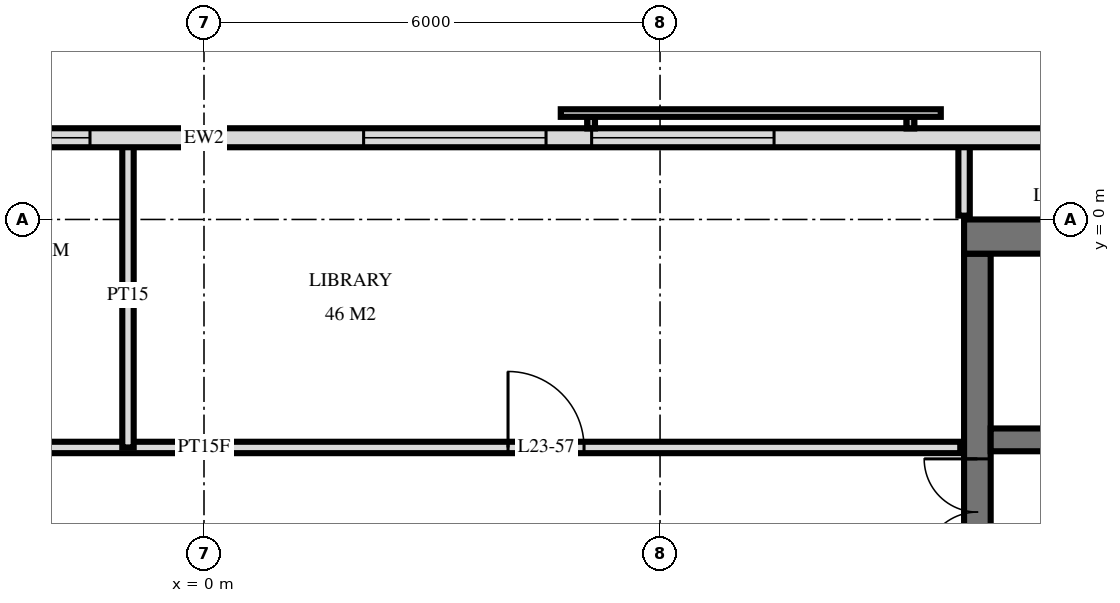
"""IFC4 building model, lengths in metres.
Left out: names, types, materials, properties, quantities, classifications, styles, units other than length and angle.
Written with IfcOpenShell. Run it as: python <this file> out.ifc"""

import sys

from ifc_helpers import new_model, si_unit, direction, frame, frame_2d, origin, place, context, subcontext, project, spatial, rectangle, extrude, element, fill, save


model = new_model("IFC4")
c1 = context("Model", 3, precision=1e-05, world=origin(), true_north=direction((0.0, 1.0)))
c2 = subcontext(c1, "Body", "Model", "MODEL_VIEW")
j1 = project(units=[si_unit("LENGTHUNIT", "METRE"), si_unit("PLANEANGLEUNIT", "RADIAN")], contexts=[c1])
p1 = place(None, origin())
s1 = spatial("IfcSite", under=j1, at=p1, CompositionType="ELEMENT")
p2 = place(p1, origin())
s2 = spatial("IfcBuilding", under=s1, at=p2, CompositionType="ELEMENT")
p3 = place(p2, frame((0.0, 0.0, 92.4)))
s3 = spatial("IfcBuildingStorey", under=s2, at=p3, CompositionType="ELEMENT", Elevation=92.4)
p4 = place(p3, frame((10.0, -0.225, 0.0), z_axis=(0.0, 0.0, 1.0), x_axis=(1.0, 0.0, 0.0)))
e1 = element("IfcWall", 1, at=p4, inside=s3, PredefinedType="SHEAR", context=c2, shape_type="SweptSolid", body=[
    extrude(rectangle(XDim=19.5, YDim=0.45, at=frame_2d((9.75, 0.0))), origin(), (0.0, 0.0, 1.0), 3.6),
])
p5 = place(p3, frame((10.175, -14.55, 0.0), z_axis=(0.0, 0.0, 1.0), x_axis=(0.0, 1.0, 0.0)))
e2 = element("IfcWall", 2, at=p5, inside=s3, PredefinedType="SHEAR", context=c2, shape_type="SweptSolid", body=[
    extrude(rectangle(XDim=14.1, YDim=0.35, at=frame_2d((7.05, 0.0))), origin(), (0.0, 0.0, 1.0), 3.6),
])
p6 = place(p5, frame((8.4, 0.0, 0.0)))
e3 = element("IfcOpeningElement", 3, at=p6, cuts=e2, PredefinedType="OPENING", context=c2, shape_type="SweptSolid", body=[
    extrude(rectangle(XDim=1.4, YDim=2.4, at=frame_2d((0.7, 1.2))), frame((0.0, 0.185, 0.0), z_axis=(0.0, -1.0, 0.0), x_axis=(1.0, 0.0, 0.0)), (0.0, 0.0, 1.0), 0.37),
])
p7 = place(p5, frame((10.0, 0.0, 0.0)))
e4 = element("IfcOpeningElement", 4, at=p7, cuts=e2, PredefinedType="OPENING", context=c2, shape_type="SweptSolid", body=[
    extrude(rectangle(XDim=1.4, YDim=2.4, at=frame_2d((0.7, 1.2))), frame((0.0, 0.185, 0.0), z_axis=(0.0, -1.0, 0.0), x_axis=(1.0, 0.0, 0.0)), (0.0, 0.0, 1.0), 0.37),
])
p8 = place(p5, frame((4.0, 0.0, 0.0)))
e5 = element("IfcOpeningElement", 5, at=p8, cuts=e2, PredefinedType="OPENING", context=c2, shape_type="SweptSolid", body=[
    extrude(rectangle(XDim=1.2, YDim=2.1, at=frame_2d((0.6, 1.05))), frame((0.0, 0.185, 0.0), z_axis=(0.0, -1.0, 0.0), x_axis=(1.0, 0.0, 0.0)), (0.0, 0.0, 1.0), 0.37),
])
p9 = place(p3, frame((10.35, -2.9, 0.0), z_axis=(0.0, 0.0, 1.0), x_axis=(1.0, 0.0, 0.0)))
e6 = element("IfcWall", 6, at=p9, inside=s3, PredefinedType="SHEAR", context=c2, shape_type="SweptSolid", body=[
    extrude(rectangle(XDim=18.7, YDim=0.3, at=frame_2d((9.35, 0.0))), origin(), (0.0, 0.0, 1.0), 3.6),
])
p10 = place(p9, frame((14.65, 0.0, 0.0)))
e7 = element("IfcOpeningElement", 7, at=p10, cuts=e6, PredefinedType="OPENING", context=c2, shape_type="SweptSolid", body=[
    extrude(rectangle(XDim=1.1, YDim=2.1, at=frame_2d((0.55, 1.05))), frame((0.0, 0.16, 0.0), z_axis=(0.0, -1.0, 0.0), x_axis=(1.0, 0.0, 0.0)), (0.0, 0.0, 1.0), 0.32),
])
p11 = place(p9, frame((17.05, 0.0, 0.0)))
e8 = element("IfcOpeningElement", 8, at=p11, cuts=e6, PredefinedType="OPENING", context=c2, shape_type="SweptSolid", body=[
    extrude(rectangle(XDim=1.1, YDim=2.1, at=frame_2d((0.55, 1.05))), frame((0.0, 0.16, 0.0), z_axis=(0.0, -1.0, 0.0), x_axis=(1.0, 0.0, 0.0)), (0.0, 0.0, 1.0), 0.32),
])
p12 = place(p9, frame((6.9, 0.0, 0.0)))
e9 = element("IfcOpeningElement", 9, at=p12, cuts=e6, PredefinedType="OPENING", context=c2, shape_type="SweptSolid", body=[
    extrude(rectangle(XDim=0.9, YDim=2.1, at=frame_2d((0.45, 1.05))), frame((0.0, 0.16, 0.0), z_axis=(0.0, -1.0, 0.0), x_axis=(1.0, 0.0, 0.0)), (0.0, 0.0, 1.0), 0.32),
])
p13 = place(p9, frame((0.85, 0.0, 0.0)))
e10 = element("IfcOpeningElement", 10, at=p13, cuts=e6, PredefinedType="OPENING", context=c2, shape_type="SweptSolid", body=[
    extrude(rectangle(XDim=1.0, YDim=2.1, at=frame_2d((0.5, 1.05))), frame((0.0, 0.16, 0.0), z_axis=(0.0, -1.0, 0.0), x_axis=(1.0, 0.0, 0.0)), (0.0, 0.0, 1.0), 0.32),
])
p14 = place(p9, frame((3.387, 0.0, 0.0)))
e11 = element("IfcOpeningElement", 11, at=p14, cuts=e6, PredefinedType="OPENING", context=c2, shape_type="SweptSolid", body=[
    extrude(rectangle(XDim=1.0, YDim=2.1, at=frame_2d((0.5, 1.05))), frame((0.0, 0.16, 0.0), z_axis=(0.0, -1.0, 0.0), x_axis=(1.0, 0.0, 0.0)), (0.0, 0.0, 1.0), 0.32),
])
p15 = place(p9, frame((4.812, 0.0, 0.0)))
e12 = element("IfcOpeningElement", 12, at=p15, cuts=e6, PredefinedType="OPENING", context=c2, shape_type="SweptSolid", body=[
    extrude(rectangle(XDim=1.0, YDim=2.1, at=frame_2d((0.5, 1.05))), frame((0.0, 0.16, 0.0), z_axis=(0.0, -1.0, 0.0), x_axis=(1.0, 0.0, 0.0)), (0.0, 0.0, 1.0), 0.32),
])
p16 = place(p9, frame((12.1, 0.0, 0.0)))
e13 = element("IfcOpeningElement", 13, at=p16, cuts=e6, PredefinedType="OPENING", context=c2, shape_type="SweptSolid", body=[
    extrude(rectangle(XDim=1.0, YDim=2.1, at=frame_2d((0.5, 1.05))), frame((0.0, 0.16, 0.0), z_axis=(0.0, -1.0, 0.0), x_axis=(1.0, 0.0, 0.0)), (0.0, 0.0, 1.0), 0.32),
])
p17 = place(p3, frame((28.775, 1.075, 0.0), z_axis=(0.0, 0.0, 1.0), x_axis=(-1.0, 0.0, 0.0)))
e14 = element("IfcWall", 14, at=p17, inside=s3, PredefinedType="SOLIDWALL", context=c2, shape_type="SweptSolid", body=[
    extrude(rectangle(XDim=57.551, YDim=0.25, at=frame_2d((28.775, 0.0))), origin(), (0.0, 0.0, 1.0), 3.32),
])
p18 = place(p17, frame((21.275, 0.0, 0.3)))
e15 = element("IfcOpeningElement", 15, at=p18, cuts=e14, PredefinedType="OPENING", context=c2, shape_type="SweptSolid", body=[
    extrude(rectangle(XDim=2.4, YDim=2.1, at=frame_2d((1.2, 1.05))), frame((0.0, 0.135, 0.0), z_axis=(0.0, -1.0, 0.0), x_axis=(1.0, 0.0, 0.0)), (0.0, 0.0, 1.0), 0.27),
])
p19 = place(p17, frame((24.275, 0.0, 0.3)))
e16 = element("IfcOpeningElement", 16, at=p19, cuts=e14, PredefinedType="OPENING", context=c2, shape_type="SweptSolid", body=[
    extrude(rectangle(XDim=2.4, YDim=2.1, at=frame_2d((1.2, 1.05))), frame((0.0, 0.135, 0.0), z_axis=(0.0, -1.0, 0.0), x_axis=(1.0, 0.0, 0.0)), (0.0, 0.0, 1.0), 0.27),
])
p20 = place(p17, frame((30.275, 0.0, 0.3)))
e17 = element("IfcOpeningElement", 17, at=p20, cuts=e14, PredefinedType="OPENING", context=c2, shape_type="SweptSolid", body=[
    extrude(rectangle(XDim=2.4, YDim=2.1, at=frame_2d((1.2, 1.05))), frame((0.0, 0.135, 0.0), z_axis=(0.0, -1.0, 0.0), x_axis=(1.0, 0.0, 0.0)), (0.0, 0.0, 1.0), 0.27),
])
p21 = place(p3, frame((10.0, 0.05, 0.0), z_axis=(0.0, 0.0, 1.0), x_axis=(0.0, 1.0, 0.0)))
e18 = element("IfcWall", 18, at=p21, inside=s3, PredefinedType="PARTITIONING", context=c2, shape_type="SweptSolid", body=[
    extrude(rectangle(XDim=0.97, YDim=0.15, at=frame_2d((0.485, 0.0))), origin(), (0.0, 0.0, 1.0), 3.32),
])
p22 = place(p3, frame((-1.0, -3.0, 0.0), z_axis=(0.0, 0.0, 1.0), x_axis=(0.0, 1.0, 0.0)))
e19 = element("IfcWall", 19, at=p22, inside=s3, PredefinedType="PARTITIONING", context=c2, shape_type="SweptSolid", body=[
    extrude(rectangle(XDim=4.02, YDim=0.15, at=frame_2d((2.01, 0.0))), origin(), (0.0, 0.0, 1.0), 3.32),
])
p23 = place(p3, frame((-9.95, -3.0, 0.0), z_axis=(0.0, 0.0, 1.0), x_axis=(1.0, 0.0, 0.0)))
e20 = element("IfcWall", 20, at=p23, inside=s3, PredefinedType="PARTITIONING", context=c2, shape_type="SweptSolid", body=[
    extrude(rectangle(XDim=19.9, YDim=0.15, at=frame_2d((9.95, 0.0))), origin(), (0.0, 0.0, 1.0), 3.32),
])
p24 = place(p23, frame((0.95, 0.0, 0.0)))
e21 = element("IfcOpeningElement", 21, at=p24, cuts=e20, PredefinedType="OPENING", context=c2, shape_type="SweptSolid", body=[
    extrude(rectangle(XDim=1.0, YDim=2.1, at=frame_2d((0.5, 1.05))), frame((0.0, 0.085, 0.0), z_axis=(0.0, -1.0, 0.0), x_axis=(1.0, 0.0, 0.0)), (0.0, 0.0, 1.0), 0.17),
])
p25 = place(p23, frame((3.7, 0.0, 0.0)))
e22 = element("IfcOpeningElement", 22, at=p25, cuts=e20, PredefinedType="OPENING", context=c2, shape_type="SweptSolid", body=[
    extrude(rectangle(XDim=1.0, YDim=2.1, at=frame_2d((0.5, 1.05))), frame((0.0, 0.085, 0.0), z_axis=(0.0, -1.0, 0.0), x_axis=(1.0, 0.0, 0.0)), (0.0, 0.0, 1.0), 0.17),
])
p26 = place(p23, frame((6.7, 0.0, 0.0)))
e23 = element("IfcOpeningElement", 23, at=p26, cuts=e20, PredefinedType="OPENING", context=c2, shape_type="SweptSolid", body=[
    extrude(rectangle(XDim=1.0, YDim=2.1, at=frame_2d((0.5, 1.05))), frame((0.0, 0.085, 0.0), z_axis=(0.0, -1.0, 0.0), x_axis=(1.0, 0.0, 0.0)), (0.0, 0.0, 1.0), 0.17),
])
p27 = place(p23, frame((13.95, 0.0, 0.0)))
e24 = element("IfcOpeningElement", 24, at=p27, cuts=e20, PredefinedType="OPENING", context=c2, shape_type="SweptSolid", body=[
    extrude(rectangle(XDim=1.0, YDim=2.1, at=frame_2d((0.5, 1.05))), frame((0.0, 0.085, 0.0), z_axis=(0.0, -1.0, 0.0), x_axis=(1.0, 0.0, 0.0)), (0.0, 0.0, 1.0), 0.17),
])
p28 = place(p18, origin())
e25 = element("IfcWindow", 25, at=p28, inside=s3, PartitioningType="SINGLE_PANEL", PredefinedType="WINDOW", context=c2, shape_type="SweptSolid", body=[
    extrude(rectangle(XDim=2.4, YDim=2.1, at=frame_2d((1.2, 1.05))), frame((0.0, 0.03, 0.0), z_axis=(0.0, -1.0, 0.0), x_axis=(1.0, 0.0, 0.0)), (0.0, 0.0, 1.0), 0.06),
])
fill(e15, e25)
p29 = place(p19, origin())
e26 = element("IfcWindow", 26, at=p29, inside=s3, PartitioningType="SINGLE_PANEL", PredefinedType="WINDOW", context=c2, shape_type="SweptSolid", body=[
    extrude(rectangle(XDim=2.4, YDim=2.1, at=frame_2d((1.2, 1.05))), frame((0.0, 0.03, 0.0), z_axis=(0.0, -1.0, 0.0), x_axis=(1.0, 0.0, 0.0)), (0.0, 0.0, 1.0), 0.06),
])
fill(e16, e26)
p30 = place(p20, origin())
e27 = element("IfcWindow", 27, at=p30, inside=s3, PartitioningType="SINGLE_PANEL", PredefinedType="WINDOW", context=c2, shape_type="SweptSolid", body=[
    extrude(rectangle(XDim=2.4, YDim=2.1, at=frame_2d((1.2, 1.05))), frame((0.0, 0.03, 0.0), z_axis=(0.0, -1.0, 0.0), x_axis=(1.0, 0.0, 0.0)), (0.0, 0.0, 1.0), 0.06),
])
fill(e17, e27)
p31 = place(p7, origin())
e28 = element("IfcDoor", 28, at=p31, inside=s3, OperationType="DOUBLE_DOOR_SINGLE_SWING", PredefinedType="DOOR", context=c2, shape_type="SweptSolid", body=[
    extrude(rectangle(XDim=1.4, YDim=2.4, at=frame_2d((0.7, 1.2))), frame((0.0, 0.025, 0.0), z_axis=(0.0, -1.0, 0.0), x_axis=(1.0, 0.0, 0.0)), (0.0, 0.0, 1.0), 0.05),
])
fill(e4, e28)
p32 = place(p27, origin())
e29 = element("IfcDoor", 29, at=p32, inside=s3, OperationType="SINGLE_SWING_RIGHT", PredefinedType="DOOR", context=c2, shape_type="SweptSolid", body=[
    extrude(rectangle(XDim=1.0, YDim=2.1, at=frame_2d((0.5, 1.05))), frame((0.0, 0.025, 0.0), z_axis=(0.0, -1.0, 0.0), x_axis=(1.0, 0.0, 0.0)), (0.0, 0.0, 1.0), 0.05),
])
fill(e24, e29)
save(model, sys.argv[1])
